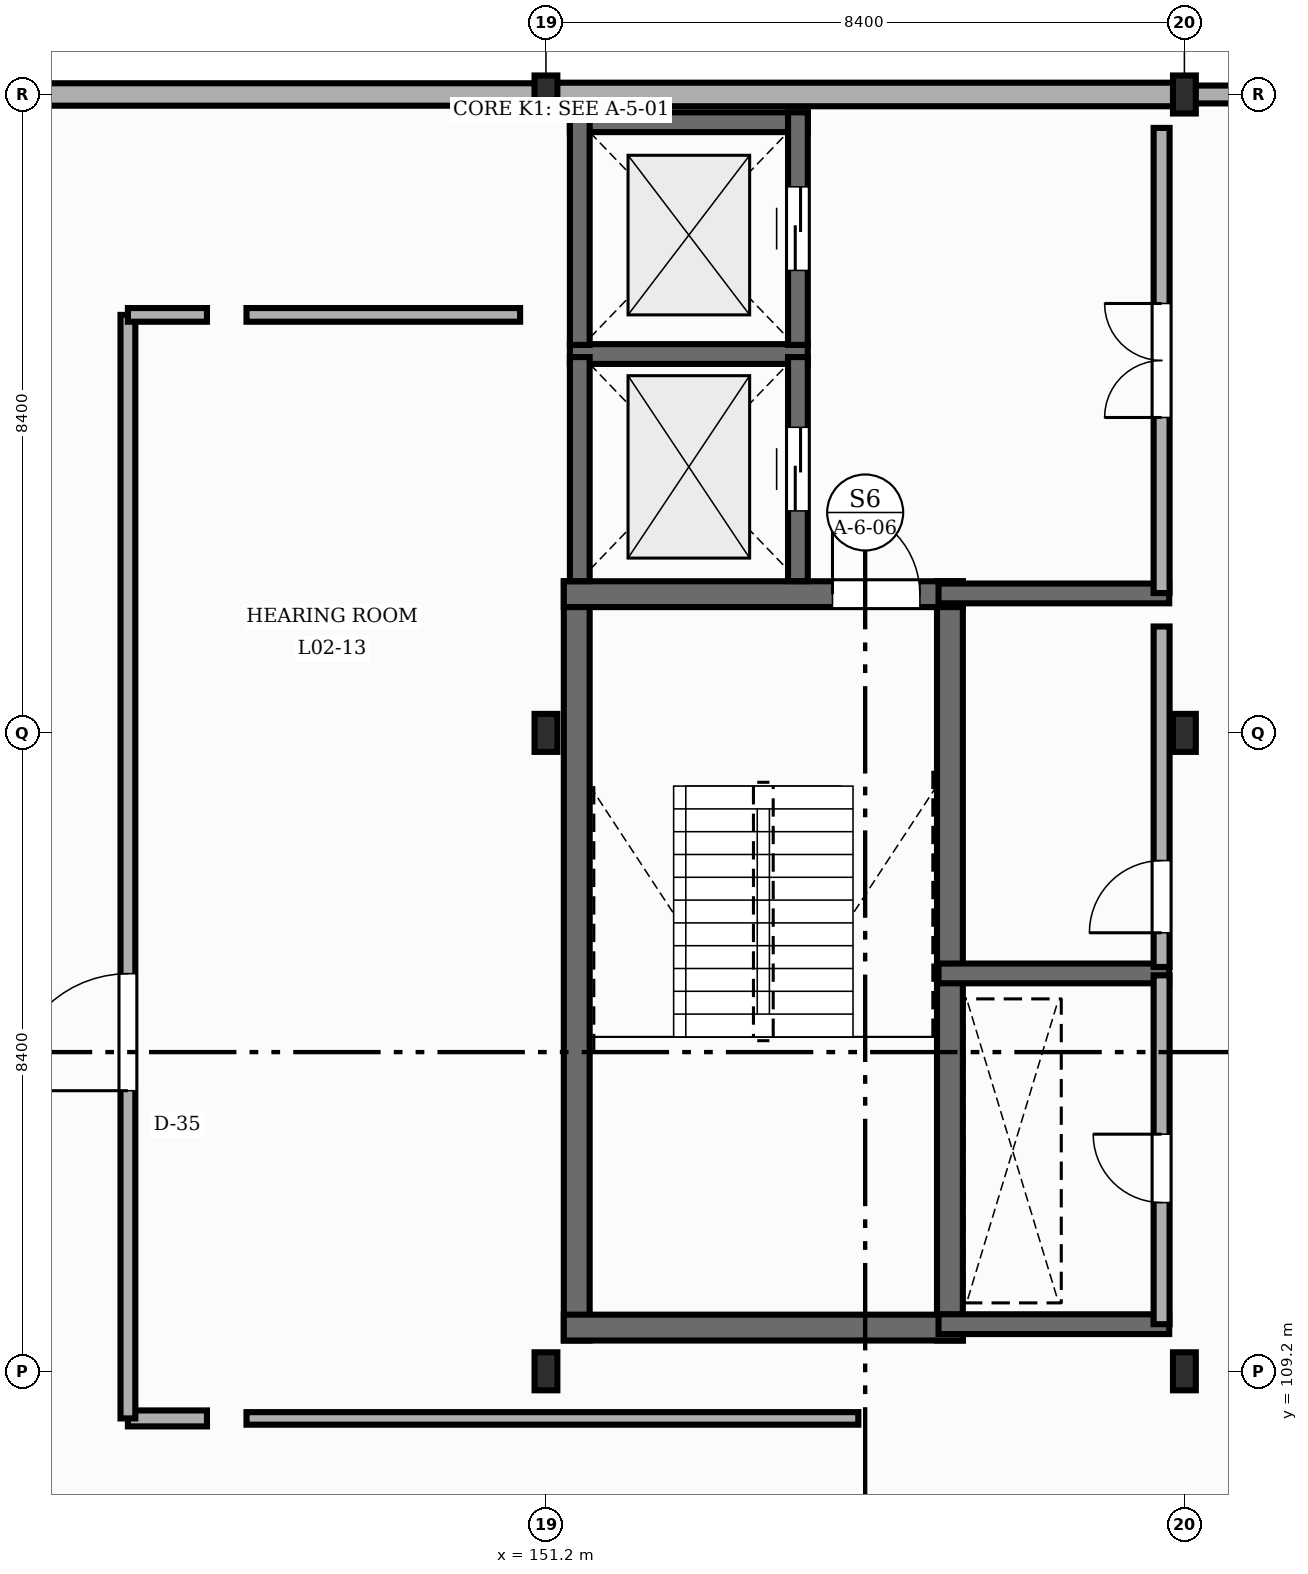
"""IFC4 building model, lengths in metres.
Left out: names, types, materials, properties, quantities, classifications, styles, units other than length and angle.
Written with IfcOpenShell. Run it as: python <this file> out.ifc"""

import sys

from ifc_helpers import new_model, si_unit, direction, frame, frame_2d, origin, origin_2d, place, context, subcontext, project, spatial, rectangle, i_section, extrude, element, fill, save


model = new_model("IFC4")
c1 = context("Model", 3, precision=1e-05, world=origin(), true_north=direction((0.0, 1.0)))
c2 = subcontext(c1, "Body", "Model", "MODEL_VIEW")
j1 = project(units=[si_unit("LENGTHUNIT", "METRE"), si_unit("PLANEANGLEUNIT", "RADIAN")], contexts=[c1])
p1 = place(None, origin())
s1 = spatial("IfcSite", under=j1, at=p1, CompositionType="ELEMENT")
p2 = place(p1, origin())
s2 = spatial("IfcBuilding", under=s1, at=p2, CompositionType="ELEMENT")
p3 = place(p2, frame((0.0, 0.0, 9.9)))
s3 = spatial("IfcBuildingStorey", under=s2, at=p3, CompositionType="ELEMENT", Elevation=9.9)
for number, where, z_axis, x_axis in (
    (1, (151.2, 109.2, 0.0), (0.0, 0.0, 1.0), (1.0, 0.0, 0.0)),
    (2, (151.2, 117.6, 0.0), (0.0, 0.0, 1.0), (1.0, 0.0, 0.0)),
    (3, (151.2, 126.0, 0.0), (0.0, 0.0, 1.0), (1.0, 0.0, 0.0)),
    (4, (159.6, 109.2, 0.0), (0.0, 0.0, 1.0), (1.0, 0.0, 0.0)),
    (5, (159.6, 117.6, 0.0), (0.0, 0.0, 1.0), (1.0, 0.0, 0.0)),
    (6, (159.6, 126.0, 0.0), (0.0, 0.0, 1.0), (1.0, 0.0, 0.0)),
):
    element("IfcColumn", number, at=place(p3, frame(where, z_axis=z_axis, x_axis=x_axis)), inside=s3, PredefinedType="COLUMN", context=c2, shape_type="SweptSolid", body=[
        extrude(i_section(OverallWidth=0.3, OverallDepth=0.5, WebThickness=0.014, FlangeThickness=0.028, FilletRadius=0.027, at=origin_2d()), origin(), (0.0, 0.0, 1.0), 4.05),
    ])
p4 = place(p3, frame((167.992, 126.0, 0.0), z_axis=(0.0, 0.0, 1.0), x_axis=(-1.0, 0.0, 0.0)))
e7 = element("IfcWall", 7, at=p4, inside=s3, PredefinedType="STANDARD", context=c2, shape_type="SweptSolid", body=[
    extrude(rectangle(XDim=8.384, YDim=0.235, at=frame_2d((4.192, 0.0))), origin(), (0.0, 0.0, 1.0), 3.472),
])
p5 = place(p3, frame((159.592, 126.0, 0.0), z_axis=(0.0, 0.0, 1.0), x_axis=(-1.0, 0.0, 0.0)))
e8 = element("IfcWall", 8, at=p5, inside=s3, PredefinedType="STANDARD", context=c2, shape_type="SweptSolid", body=[
    extrude(rectangle(XDim=8.384, YDim=0.31, at=frame_2d((4.192, 0.0))), origin(), (0.0, 0.0, 1.0), 3.502),
])
p6 = place(p3, frame((151.192, 126.0, 0.0), z_axis=(0.0, 0.0, 1.0), x_axis=(-1.0, 0.0, 0.0)))
e9 = element("IfcWall", 9, at=p6, inside=s3, PredefinedType="STANDARD", context=c2, shape_type="SweptSolid", body=[
    extrude(rectangle(XDim=8.384, YDim=0.295, at=frame_2d((4.192, 0.0))), origin(), (0.0, 0.0, 1.0), 3.472),
])
for number, where, z_axis, x_axis in (
    (10, (151.605, 109.605, 0.0), (0.0, 0.0, 1.0), (0.0, 1.0, 0.0)),
    (11, (156.515, 109.605, 0.0), (0.0, 0.0, 1.0), (0.0, 1.0, 0.0)),
):
    element("IfcWall", number, at=place(p3, frame(where, z_axis=z_axis, x_axis=x_axis)), inside=s3, PredefinedType="SHEAR", context=c2, shape_type="SweptSolid", body=[
        extrude(rectangle(XDim=9.99, YDim=0.34, at=frame_2d((4.995, 0.0))), origin(), (0.0, 0.0, 1.0), 3.84),
    ])
p7 = place(p3, frame((151.435, 109.775, 0.0), z_axis=(0.0, 0.0, 1.0), x_axis=(1.0, 0.0, 0.0)))
e12 = element("IfcWall", 12, at=p7, inside=s3, PredefinedType="SHEAR", context=c2, shape_type="SweptSolid", body=[
    extrude(rectangle(XDim=5.25, YDim=0.34, at=frame_2d((2.625, 0.0))), origin(), (0.0, 0.0, 1.0), 3.84),
])
p8 = place(p3, frame((151.435, 119.425, 0.0), z_axis=(0.0, 0.0, 1.0), x_axis=(1.0, 0.0, 0.0)))
e13 = element("IfcWall", 13, at=p8, inside=s3, PredefinedType="SHEAR", context=c2, shape_type="SweptSolid", body=[
    extrude(rectangle(XDim=5.25, YDim=0.34, at=frame_2d((2.625, 0.0))), origin(), (0.0, 0.0, 1.0), 3.84),
])
p9 = place(p8, frame((3.535, 0.0, 0.0)))
e14 = element("IfcOpeningElement", 14, at=p9, cuts=e13, PredefinedType="OPENING", context=c2, shape_type="SweptSolid", body=[
    extrude(rectangle(XDim=1.15, YDim=2.15, at=frame_2d((0.575, 1.075))), frame((0.0, 0.18, 0.0), z_axis=(0.0, -1.0, 0.0), x_axis=(1.0, 0.0, 0.0)), (0.0, 0.0, 1.0), 0.36),
])
p10 = place(p3, frame((151.515, 122.585, 0.0), z_axis=(0.0, 0.0, 1.0), x_axis=(1.0, 0.0, 0.0)))
e15 = element("IfcWall", 15, at=p10, inside=s3, PredefinedType="SHEAR", context=c2, shape_type="SweptSolid", body=[
    extrude(rectangle(XDim=3.13, YDim=0.26, at=frame_2d((1.565, 0.0))), origin(), (0.0, 0.0, 1.0), 3.84),
])
p11 = place(p3, frame((151.645, 119.597, 0.0), z_axis=(0.0, 0.0, 1.0), x_axis=(0.0, 1.0, 0.0)))
e16 = element("IfcWall", 16, at=p11, inside=s3, PredefinedType="SHEAR", context=c2, shape_type="SweptSolid", body=[
    extrude(rectangle(XDim=2.948, YDim=0.26, at=frame_2d((1.474, 0.0))), origin(), (0.0, 0.0, 1.0), 3.84),
])
p12 = place(p3, frame((154.515, 119.597, 0.0), z_axis=(0.0, 0.0, 1.0), x_axis=(0.0, 1.0, 0.0)))
e17 = element("IfcWall", 17, at=p12, inside=s3, PredefinedType="SHEAR", context=c2, shape_type="SweptSolid", body=[
    extrude(rectangle(XDim=2.948, YDim=0.26, at=frame_2d((1.474, 0.0))), origin(), (0.0, 0.0, 1.0), 3.84),
])
p13 = place(p12, frame((0.924, 0.0, 0.0)))
e18 = element("IfcOpeningElement", 18, at=p13, cuts=e17, PredefinedType="OPENING", context=c2, shape_type="SweptSolid", body=[
    extrude(rectangle(XDim=1.1, YDim=2.15, at=frame_2d((0.55, 1.075))), frame((0.0, 0.14, 0.0), z_axis=(0.0, -1.0, 0.0), x_axis=(1.0, 0.0, 0.0)), (0.0, 0.0, 1.0), 0.28),
])
p14 = place(p3, frame((151.515, 125.635, 0.0), z_axis=(0.0, 0.0, 1.0), x_axis=(1.0, 0.0, 0.0)))
e19 = element("IfcWall", 19, at=p14, inside=s3, PredefinedType="SHEAR", context=c2, shape_type="SweptSolid", body=[
    extrude(rectangle(XDim=3.13, YDim=0.26, at=frame_2d((1.565, 0.0))), origin(), (0.0, 0.0, 1.0), 3.84),
])
p15 = place(p3, frame((151.645, 122.705, 0.0), z_axis=(0.0, 0.0, 1.0), x_axis=(0.0, 1.0, 0.0)))
e20 = element("IfcWall", 20, at=p15, inside=s3, PredefinedType="SHEAR", context=c2, shape_type="SweptSolid", body=[
    extrude(rectangle(XDim=3.06, YDim=0.26, at=frame_2d((1.53, 0.0))), origin(), (0.0, 0.0, 1.0), 3.84),
])
p16 = place(p3, frame((154.515, 122.705, 0.0), z_axis=(0.0, 0.0, 1.0), x_axis=(0.0, 1.0, 0.0)))
e21 = element("IfcWall", 21, at=p16, inside=s3, PredefinedType="SHEAR", context=c2, shape_type="SweptSolid", body=[
    extrude(rectangle(XDim=3.06, YDim=0.26, at=frame_2d((1.53, 0.0))), origin(), (0.0, 0.0, 1.0), 3.84),
])
p17 = place(p16, frame((0.98, 0.0, 0.0)))
e22 = element("IfcOpeningElement", 22, at=p17, cuts=e21, PredefinedType="OPENING", context=c2, shape_type="SweptSolid", body=[
    extrude(rectangle(XDim=1.1, YDim=2.15, at=frame_2d((0.55, 1.075))), frame((0.0, 0.14, 0.0), z_axis=(0.0, -1.0, 0.0), x_axis=(1.0, 0.0, 0.0)), (0.0, 0.0, 1.0), 0.28),
])
for number, where, z_axis, x_axis in (
    (23, (156.365, 109.82, 0.0), (0.0, 0.0, 1.0), (1.0, 0.0, 0.0)),
    (24, (156.365, 114.435, 0.0), (0.0, 0.0, 1.0), (1.0, 0.0, 0.0)),
    (25, (156.365, 119.435, 0.0), (0.0, 0.0, 1.0), (1.0, 0.0, 0.0)),
):
    element("IfcWall", number, at=place(p3, frame(where, z_axis=z_axis, x_axis=x_axis)), inside=s3, PredefinedType="SHEAR", context=c2, shape_type="SweptSolid", body=[
        extrude(rectangle(XDim=3.035, YDim=0.26, at=frame_2d((1.518, 0.0))), origin(), (0.0, 0.0, 1.0), 3.84),
    ])
p18 = place(p3, frame((159.3, 109.82, 0.0), z_axis=(0.0, 0.0, 1.0), x_axis=(0.0, 1.0, 0.0)))
e26 = element("IfcWall", 26, at=p18, inside=s3, PredefinedType="STANDARD", context=c2, shape_type="SweptSolid", body=[
    extrude(rectangle(XDim=4.59, YDim=0.21, at=frame_2d((2.295, 0.0))), origin(), (0.0, 0.0, 1.0), 3.342),
])
p19 = place(p18, frame((1.6, 0.0, 0.0)))
e27 = element("IfcOpeningElement", 27, at=p19, cuts=e26, PredefinedType="OPENING", context=c2, shape_type="SweptSolid", body=[
    extrude(rectangle(XDim=0.9, YDim=2.1, at=frame_2d((0.45, 1.05))), frame((0.0, 0.115, 0.0), z_axis=(0.0, -1.0, 0.0), x_axis=(1.0, 0.0, 0.0)), (0.0, 0.0, 1.0), 0.23),
])
p20 = place(p3, frame((159.3, 114.52, 0.0), z_axis=(0.0, 0.0, 1.0), x_axis=(0.0, 1.0, 0.0)))
e28 = element("IfcWall", 28, at=p20, inside=s3, PredefinedType="STANDARD", context=c2, shape_type="SweptSolid", body=[
    extrude(rectangle(XDim=4.48, YDim=0.21, at=frame_2d((2.24, 0.0))), origin(), (0.0, 0.0, 1.0), 3.342),
])
p21 = place(p20, frame((0.45, 0.0, 0.0)))
e29 = element("IfcOpeningElement", 29, at=p21, cuts=e28, PredefinedType="OPENING", context=c2, shape_type="SweptSolid", body=[
    extrude(rectangle(XDim=0.95, YDim=2.15, at=frame_2d((0.475, 1.075))), frame((0.0, 0.115, 0.0), z_axis=(0.0, -1.0, 0.0), x_axis=(1.0, 0.0, 0.0)), (0.0, 0.0, 1.0), 0.23),
])
p22 = place(p3, frame((159.3, 119.44, 0.0), z_axis=(0.0, 0.0, 1.0), x_axis=(0.0, 1.0, 0.0)))
e30 = element("IfcWall", 30, at=p22, inside=s3, PredefinedType="STANDARD", context=c2, shape_type="SweptSolid", body=[
    extrude(rectangle(XDim=6.12, YDim=0.21, at=frame_2d((3.06, 0.0))), origin(), (0.0, 0.0, 1.0), 3.432),
])
p23 = place(p22, frame((2.31, 0.0, 0.0)))
e31 = element("IfcOpeningElement", 31, at=p23, cuts=e30, PredefinedType="OPENING", context=c2, shape_type="SweptSolid", body=[
    extrude(rectangle(XDim=1.5, YDim=2.2, at=frame_2d((0.75, 1.1))), frame((0.0, 0.115, 0.0), z_axis=(0.0, -1.0, 0.0), x_axis=(1.0, 0.0, 0.0)), (0.0, 0.0, 1.0), 0.23),
])
p24 = place(p3, frame((147.26, 123.1, -0.004), z_axis=(0.0, 0.0, 1.0), x_axis=(1.0, 0.0, 0.0)))
e32 = element("IfcWall", 32, at=p24, inside=s3, PredefinedType="STANDARD", context=c2, shape_type="SweptSolid", body=[
    extrude(rectangle(XDim=3.6, YDim=0.18, at=frame_2d((1.8, 0.0))), origin(), (0.0, 0.0, 1.0), 3.844),
])
p25 = place(p3, frame((155.31, 108.58, -0.004), z_axis=(0.0, 0.0, 1.0), x_axis=(-1.0, 0.0, 0.0)))
e33 = element("IfcWall", 33, at=p25, inside=s3, PredefinedType="STANDARD", context=c2, shape_type="SweptSolid", body=[
    extrude(rectangle(XDim=8.05, YDim=0.165, at=frame_2d((4.025, 0.0))), origin(), (0.0, 0.0, 1.0), 3.844),
])
p26 = place(p3, frame((146.74, 108.58, -0.004), z_axis=(0.0, 0.0, 1.0), x_axis=(-1.0, 0.0, 0.0)))
e34 = element("IfcWall", 34, at=p26, inside=s3, PredefinedType="STANDARD", context=c2, shape_type="SweptSolid", body=[
    extrude(rectangle(XDim=1.04, YDim=0.21, at=frame_2d((0.52, 0.0))), origin(), (0.0, 0.0, 1.0), 3.844),
])
p27 = place(p3, frame((145.7, 108.58, -0.004), z_axis=(0.0, 0.0, 1.0), x_axis=(0.0, 1.0, 0.0)))
e35 = element("IfcWall", 35, at=p27, inside=s3, PredefinedType="STANDARD", context=c2, shape_type="SweptSolid", body=[
    extrude(rectangle(XDim=14.52, YDim=0.195, at=frame_2d((7.26, 0.0))), origin(), (0.0, 0.0, 1.0), 3.566),
])
p28 = place(p27, frame((4.312, 0.0, 0.0)))
e36 = element("IfcOpeningElement", 36, at=p28, cuts=e35, PredefinedType="OPENING", context=c2, shape_type="SweptSolid", body=[
    extrude(rectangle(XDim=1.54, YDim=2.3, at=frame_2d((0.77, 1.15))), frame((0.0, 0.107, 0.0), z_axis=(0.0, -1.0, 0.0), x_axis=(1.0, 0.0, 0.0)), (0.0, 0.0, 1.0), 0.215),
])
p29 = place(p3, frame((145.7, 123.1, -0.004), z_axis=(0.0, 0.0, 1.0), x_axis=(1.0, 0.0, 0.0)))
e37 = element("IfcWall", 37, at=p29, inside=s3, PredefinedType="STANDARD", context=c2, shape_type="SweptSolid", body=[
    extrude(rectangle(XDim=1.04, YDim=0.18, at=frame_2d((0.52, 0.0))), origin(), (0.0, 0.0, 1.0), 3.844),
])
p30 = place(p9, origin())
e38 = element("IfcDoor", 38, at=p30, inside=s3, OperationType="SINGLE_SWING_LEFT", PredefinedType="DOOR", context=c2, shape_type="SweptSolid", body=[
    extrude(rectangle(XDim=1.15, YDim=2.15, at=frame_2d((0.575, 1.075))), frame((0.0, 0.025, 0.0), z_axis=(0.0, -1.0, 0.0), x_axis=(1.0, 0.0, 0.0)), (0.0, 0.0, 1.0), 0.05),
])
fill(e14, e38)
p31 = place(p13, origin())
e39 = element("IfcDoor", 39, at=p31, inside=s3, OperationType="DOUBLE_DOOR_SLIDING", PredefinedType="DOOR", context=c2, shape_type="SweptSolid", body=[
    extrude(rectangle(XDim=1.1, YDim=2.15, at=frame_2d((0.55, 1.075))), frame((0.0, 0.025, 0.0), z_axis=(0.0, -1.0, 0.0), x_axis=(1.0, 0.0, 0.0)), (0.0, 0.0, 1.0), 0.05),
])
fill(e18, e39)
p32 = place(p17, origin())
e40 = element("IfcDoor", 40, at=p32, inside=s3, OperationType="DOUBLE_DOOR_SLIDING", PredefinedType="DOOR", context=c2, shape_type="SweptSolid", body=[
    extrude(rectangle(XDim=1.1, YDim=2.15, at=frame_2d((0.55, 1.075))), frame((0.0, 0.025, 0.0), z_axis=(0.0, -1.0, 0.0), x_axis=(1.0, 0.0, 0.0)), (0.0, 0.0, 1.0), 0.05),
])
fill(e22, e40)
p33 = place(p19, origin())
e41 = element("IfcDoor", 41, at=p33, inside=s3, OperationType="SINGLE_SWING_RIGHT", PredefinedType="DOOR", context=c2, shape_type="SweptSolid", body=[
    extrude(rectangle(XDim=0.9, YDim=2.1, at=frame_2d((0.45, 1.05))), frame((0.0, 0.025, 0.0), z_axis=(0.0, -1.0, 0.0), x_axis=(1.0, 0.0, 0.0)), (0.0, 0.0, 1.0), 0.05),
])
fill(e27, e41)
p34 = place(p21, origin())
e42 = element("IfcDoor", 42, at=p34, inside=s3, OperationType="SINGLE_SWING_LEFT", PredefinedType="DOOR", context=c2, shape_type="SweptSolid", body=[
    extrude(rectangle(XDim=0.95, YDim=2.15, at=frame_2d((0.475, 1.075))), frame((0.0, 0.025, 0.0), z_axis=(0.0, -1.0, 0.0), x_axis=(1.0, 0.0, 0.0)), (0.0, 0.0, 1.0), 0.05),
])
fill(e29, e42)
p35 = place(p23, origin())
e43 = element("IfcDoor", 43, at=p35, inside=s3, OperationType="DOUBLE_DOOR_SINGLE_SWING", PredefinedType="DOOR", context=c2, shape_type="SweptSolid", body=[
    extrude(rectangle(XDim=1.5, YDim=2.2, at=frame_2d((0.75, 1.1))), frame((0.0, 0.025, 0.0), z_axis=(0.0, -1.0, 0.0), x_axis=(1.0, 0.0, 0.0)), (0.0, 0.0, 1.0), 0.05),
])
fill(e31, e43)
p36 = place(p28, origin())
e44 = element("IfcDoor", 44, at=p36, inside=s3, OperationType="SINGLE_SWING_LEFT", PredefinedType="DOOR", context=c2, shape_type="SweptSolid", body=[
    extrude(rectangle(XDim=1.54, YDim=2.3, at=frame_2d((0.77, 1.15))), frame((0.0, 0.025, 0.0), z_axis=(0.0, -1.0, 0.0), x_axis=(1.0, 0.0, 0.0)), (0.0, 0.0, 1.0), 0.05),
])
fill(e36, e44)
save(model, sys.argv[1])
